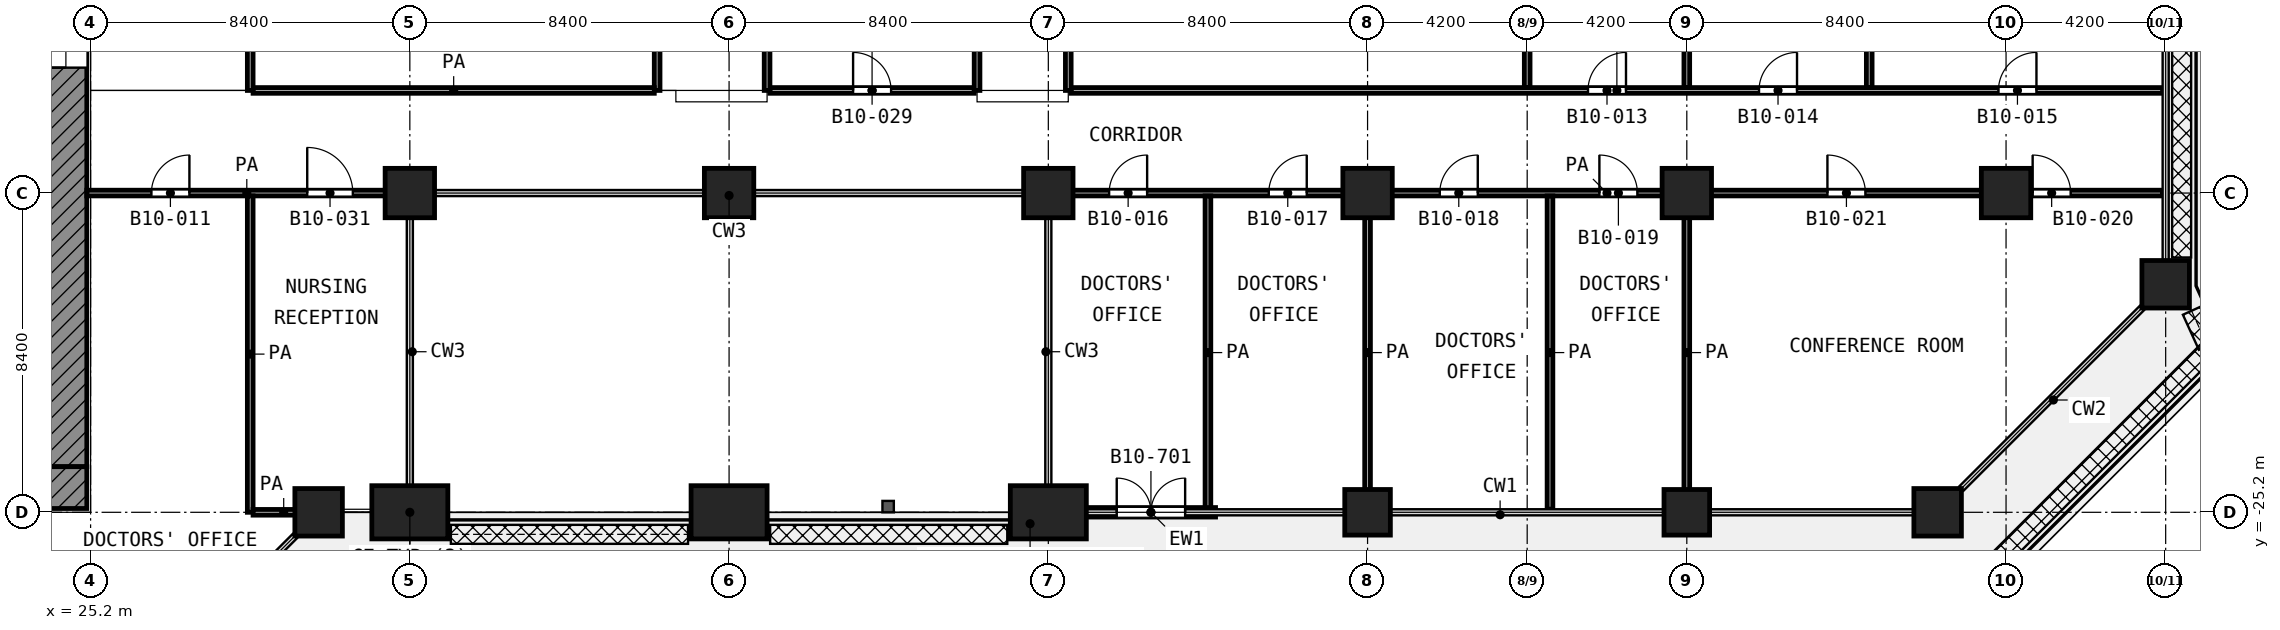
"""IFC4 building model, lengths in metres.
Left out: names, types, materials, properties, quantities, classifications, styles, units other than length and angle.
Written with IfcOpenShell. Run it as: python <this file> out.ifc"""

import sys

from ifc_helpers import new_model, si_unit, direction, frame, frame_2d, origin, origin_2d, place, context, subcontext, project, spatial, rectangle, extrude, element, fill, save


model = new_model("IFC4")
c1 = context("Model", 3, precision=1e-05, world=origin(), true_north=direction((0.0, 1.0)))
c2 = subcontext(c1, "Body", "Model", "MODEL_VIEW")
j1 = project(units=[si_unit("LENGTHUNIT", "METRE"), si_unit("PLANEANGLEUNIT", "RADIAN")], contexts=[c1])
p1 = place(None, origin())
s1 = spatial("IfcSite", under=j1, at=p1, CompositionType="ELEMENT")
p2 = place(p1, origin())
s2 = spatial("IfcBuilding", under=s1, at=p2, CompositionType="ELEMENT")
p3 = place(p2, frame((0.0, 0.0, 47.6)))
s3 = spatial("IfcBuildingStorey", under=s2, at=p3, CompositionType="ELEMENT", Elevation=47.6)
for number, where, z_axis, x_axis in (
    (1, (33.6, -16.8, 0.0), (0.0, 0.0, 1.0), (1.0, 0.0, 0.0)),
    (2, (42.0, -16.8, 0.0), (0.0, 0.0, 1.0), (1.0, 0.0, 0.0)),
    (3, (50.4, -16.8, 0.0), (0.0, 0.0, 1.0), (1.0, 0.0, 0.0)),
    (4, (58.8, -16.8, 0.0), (0.0, 0.0, 1.0), (1.0, 0.0, 0.0)),
    (5, (67.2, -16.8, 0.0), (0.0, 0.0, 1.0), (1.0, 0.0, 0.0)),
    (6, (75.6, -16.8, 0.0), (0.0, 0.0, 1.0), (1.0, 0.0, 0.0)),
):
    element("IfcColumn", number, at=place(p3, frame(where, z_axis=z_axis, x_axis=x_axis)), inside=s3, PredefinedType="COLUMN", context=c2, shape_type="SweptSolid", body=[
        extrude(rectangle(XDim=1.3, YDim=1.3, at=origin_2d()), origin(), (0.0, 0.0, 1.0), 4.2),
    ])
for number, where, z_axis, x_axis in (
    (7, (79.8, -19.2, 0.0), (0.0, 0.0, 1.0), (1.0, 0.0, 0.0)),
    (8, (31.2, -25.2, 0.0), (0.0, 0.0, 1.0), (1.0, 0.0, 0.0)),
):
    element("IfcColumn", number, at=place(p3, frame(where, z_axis=z_axis, x_axis=x_axis)), inside=s3, PredefinedType="COLUMN", context=c2, shape_type="SweptSolid", body=[
        extrude(rectangle(XDim=1.25, YDim=1.25, at=origin_2d()), origin(), (0.0, 0.0, 1.0), 4.2),
    ])
for number, where, z_axis, x_axis in (
    (9, (33.6, -25.2, 0.0), (0.0, 0.0, 1.0), (-1.0, 0.0, 0.0)),
    (10, (42.0, -25.2, 0.0), (0.0, 0.0, 1.0), (-1.0, 0.0, 0.0)),
    (11, (50.4, -25.2, 0.0), (0.0, 0.0, 1.0), (-1.0, 0.0, 0.0)),
):
    element("IfcColumn", number, at=place(p3, frame(where, z_axis=z_axis, x_axis=x_axis)), inside=s3, PredefinedType="COLUMN", context=c2, shape_type="SweptSolid", body=[
        extrude(rectangle(XDim=2.0, YDim=1.4, at=origin_2d()), origin(), (0.0, 0.0, 1.0), 4.2),
    ])
for number, where, z_axis, x_axis in (
    (12, (58.8, -25.2, 0.0), (0.0, 0.0, 1.0), (1.0, 0.0, 0.0)),
    (13, (67.2, -25.2, 0.0), (0.0, 0.0, 1.0), (1.0, 0.0, 0.0)),
):
    element("IfcColumn", number, at=place(p3, frame(where, z_axis=z_axis, x_axis=x_axis)), inside=s3, PredefinedType="COLUMN", context=c2, shape_type="SweptSolid", body=[
        extrude(rectangle(XDim=1.2, YDim=1.2, at=origin_2d()), origin(), (0.0, 0.0, 1.0), 4.2),
    ])
p4 = place(p3, frame((73.8, -25.2, 0.0), z_axis=(0.0, 0.0, 1.0), x_axis=(1.0, 0.0, 0.0)))
e14 = element("IfcColumn", 14, at=p4, inside=s3, PredefinedType="COLUMN", context=c2, shape_type="SweptSolid", body=[
    extrude(rectangle(XDim=1.25, YDim=1.25, at=origin_2d()), origin(), (0.0, 0.0, 1.0), 4.2),
])
p5 = place(p3, frame((51.4, -25.2, 0.0), z_axis=(0.0, 0.0, 1.0), x_axis=(1.0, 0.0, 0.0)))
e15 = element("IfcWall", 15, at=p5, inside=s3, PredefinedType="SOLIDWALL", context=c2, shape_type="SweptSolid", body=[
    extrude(rectangle(XDim=3.4, YDim=0.25, at=frame_2d((1.7, 0.0))), origin(), (0.0, 0.0, 1.0), 3.66),
])
p6 = place(p5, frame((0.8, 0.0, 0.0)))
e16 = element("IfcOpeningElement", 16, at=p6, cuts=e15, PredefinedType="OPENING", context=c2, shape_type="SweptSolid", body=[
    extrude(rectangle(XDim=1.8, YDim=2.1, at=frame_2d((0.9, 1.05))), frame((0.0, 0.135, 0.0), z_axis=(0.0, -1.0, 0.0), x_axis=(1.0, 0.0, 0.0)), (0.0, 0.0, 1.0), 0.27),
])
p7 = place(p3, frame((24.55, -24.0, 0.0), z_axis=(0.0, 0.0, 1.0), x_axis=(0.0, 1.0, 0.0)))
e17 = element("IfcWall", 17, at=p7, inside=s3, PredefinedType="SHEAR", context=c2, shape_type="SweptSolid", body=[
    extrude(rectangle(XDim=18.6, YDim=1.1, at=frame_2d((9.3, 0.0))), origin(), (0.0, 0.0, 1.0), 3.78),
])
p8 = place(p7, frame((10.5, 0.0, 0.0)))
e18 = element("IfcOpeningElement", 18, at=p8, cuts=e17, PredefinedType="OPENING", context=c2, shape_type="SweptSolid", body=[
    extrude(rectangle(XDim=1.8, YDim=2.1, at=frame_2d((0.9, 1.05))), frame((0.0, 0.56, 0.0), z_axis=(0.0, -1.0, 0.0), x_axis=(1.0, 0.0, 0.0)), (0.0, 0.0, 1.0), 1.12),
])
p9 = place(p3, frame((24.55, -25.1, 0.0), z_axis=(0.0, 0.0, 1.0), x_axis=(0.0, 1.0, 0.0)))
e19 = element("IfcWall", 19, at=p9, inside=s3, PredefinedType="SHEAR", context=c2, shape_type="SweptSolid", body=[
    extrude(rectangle(XDim=1.1, YDim=1.1, at=frame_2d((0.55, 0.0))), origin(), (0.0, 0.0, 1.0), 3.78),
])
p10 = place(p3, frame((29.475, -25.2, 0.0), z_axis=(0.0, 0.0, 1.0), x_axis=(1.0, 0.0, 0.0)))
e20 = element("IfcWall", 20, at=p10, inside=s3, PredefinedType="PARTITIONING", context=c2, shape_type="SweptSolid", body=[
    extrude(rectangle(XDim=1.612, YDim=0.15, at=frame_2d((0.806, 0.0))), origin(), (0.0, 0.0, 1.0), 3.78),
])
p11 = place(p3, frame((25.1, -16.8, 0.0), z_axis=(0.0, 0.0, 1.0), x_axis=(1.0, 0.0, 0.0)))
e21 = element("IfcWall", 21, at=p11, inside=s3, PredefinedType="PARTITIONING", context=c2, shape_type="SweptSolid", body=[
    extrude(rectangle(XDim=8.42, YDim=0.15, at=frame_2d((4.21, 0.0))), origin(), (0.0, 0.0, 1.0), 3.78),
])
p12 = place(p11, frame((1.7, 0.0, 0.0)))
e22 = element("IfcOpeningElement", 22, at=p12, cuts=e21, PredefinedType="OPENING", context=c2, shape_type="SweptSolid", body=[
    extrude(rectangle(XDim=1.0, YDim=2.1, at=frame_2d((0.5, 1.05))), frame((0.0, 0.085, 0.0), z_axis=(0.0, -1.0, 0.0), x_axis=(1.0, 0.0, 0.0)), (0.0, 0.0, 1.0), 0.17),
])
p13 = place(p11, frame((5.8, 0.0, 0.0)))
e23 = element("IfcOpeningElement", 23, at=p13, cuts=e21, PredefinedType="OPENING", context=c2, shape_type="SweptSolid", body=[
    extrude(rectangle(XDim=1.2, YDim=2.1, at=frame_2d((0.6, 1.05))), frame((0.0, 0.085, 0.0), z_axis=(0.0, -1.0, 0.0), x_axis=(1.0, 0.0, 0.0)), (0.0, 0.0, 1.0), 0.17),
])
p14 = place(p3, frame((50.48, -16.8, 0.0), z_axis=(0.0, 0.0, 1.0), x_axis=(1.0, 0.0, 0.0)))
e24 = element("IfcWall", 24, at=p14, inside=s3, PredefinedType="PARTITIONING", context=c2, shape_type="SweptSolid", body=[
    extrude(rectangle(XDim=29.24, YDim=0.15, at=frame_2d((14.62, 0.0))), origin(), (0.0, 0.0, 1.0), 3.78),
])
p15 = place(p14, frame((1.52, 0.0, 0.0)))
e25 = element("IfcOpeningElement", 25, at=p15, cuts=e24, PredefinedType="OPENING", context=c2, shape_type="SweptSolid", body=[
    extrude(rectangle(XDim=1.0, YDim=2.1, at=frame_2d((0.5, 1.05))), frame((0.0, 0.085, 0.0), z_axis=(0.0, -1.0, 0.0), x_axis=(1.0, 0.0, 0.0)), (0.0, 0.0, 1.0), 0.17),
])
p16 = place(p14, frame((5.72, 0.0, 0.0)))
e26 = element("IfcOpeningElement", 26, at=p16, cuts=e24, PredefinedType="OPENING", context=c2, shape_type="SweptSolid", body=[
    extrude(rectangle(XDim=1.0, YDim=2.1, at=frame_2d((0.5, 1.05))), frame((0.0, 0.085, 0.0), z_axis=(0.0, -1.0, 0.0), x_axis=(1.0, 0.0, 0.0)), (0.0, 0.0, 1.0), 0.17),
])
p17 = place(p14, frame((10.22, 0.0, 0.0)))
e27 = element("IfcOpeningElement", 27, at=p17, cuts=e24, PredefinedType="OPENING", context=c2, shape_type="SweptSolid", body=[
    extrude(rectangle(XDim=1.0, YDim=2.1, at=frame_2d((0.5, 1.05))), frame((0.0, 0.085, 0.0), z_axis=(0.0, -1.0, 0.0), x_axis=(1.0, 0.0, 0.0)), (0.0, 0.0, 1.0), 0.17),
])
p18 = place(p14, frame((14.42, 0.0, 0.0)))
e28 = element("IfcOpeningElement", 28, at=p18, cuts=e24, PredefinedType="OPENING", context=c2, shape_type="SweptSolid", body=[
    extrude(rectangle(XDim=1.0, YDim=2.1, at=frame_2d((0.5, 1.05))), frame((0.0, 0.085, 0.0), z_axis=(0.0, -1.0, 0.0), x_axis=(1.0, 0.0, 0.0)), (0.0, 0.0, 1.0), 0.17),
])
p19 = place(p14, frame((25.82, 0.0, 0.0)))
e29 = element("IfcOpeningElement", 29, at=p19, cuts=e24, PredefinedType="OPENING", context=c2, shape_type="SweptSolid", body=[
    extrude(rectangle(XDim=1.0, YDim=2.1, at=frame_2d((0.5, 1.05))), frame((0.0, 0.085, 0.0), z_axis=(0.0, -1.0, 0.0), x_axis=(1.0, 0.0, 0.0)), (0.0, 0.0, 1.0), 0.17),
])
p20 = place(p14, frame((20.42, 0.0, 0.0)))
e30 = element("IfcOpeningElement", 30, at=p20, cuts=e24, PredefinedType="OPENING", context=c2, shape_type="SweptSolid", body=[
    extrude(rectangle(XDim=1.0, YDim=2.1, at=frame_2d((0.5, 1.05))), frame((0.0, 0.085, 0.0), z_axis=(0.0, -1.0, 0.0), x_axis=(1.0, 0.0, 0.0)), (0.0, 0.0, 1.0), 0.17),
])
p21 = place(p3, frame((29.475, -14.1, 0.0), z_axis=(0.0, 0.0, 1.0), x_axis=(1.0, 0.0, 0.0)))
e31 = element("IfcWall", 31, at=p21, inside=s3, PredefinedType="PARTITIONING", context=c2, shape_type="SweptSolid", body=[
    extrude(rectangle(XDim=10.557, YDim=0.15, at=frame_2d((5.278, 0.0))), origin(), (0.0, 0.0, 1.0), 3.78),
])
p22 = place(p3, frame((43.075, -14.1, 0.0), z_axis=(0.0, 0.0, 1.0), x_axis=(1.0, 0.0, 0.0)))
e32 = element("IfcWall", 32, at=p22, inside=s3, PredefinedType="PARTITIONING", context=c2, shape_type="SweptSolid", body=[
    extrude(rectangle(XDim=5.375, YDim=0.15, at=frame_2d((2.688, 0.0))), origin(), (0.0, 0.0, 1.0), 3.78),
])
p23 = place(p22, frame((2.188, 0.0, 0.0)))
e33 = element("IfcOpeningElement", 33, at=p23, cuts=e32, PredefinedType="OPENING", context=c2, shape_type="SweptSolid", body=[
    extrude(rectangle(XDim=1.0, YDim=2.1, at=frame_2d((0.5, 1.05))), frame((0.0, 0.085, 0.0), z_axis=(0.0, -1.0, 0.0), x_axis=(1.0, 0.0, 0.0)), (0.0, 0.0, 1.0), 0.17),
])
p24 = place(p3, frame((51.0, -14.1, 0.0), z_axis=(0.0, 0.0, 1.0), x_axis=(1.0, 0.0, 0.0)))
e34 = element("IfcWall", 34, at=p24, inside=s3, PredefinedType="PARTITIONING", context=c2, shape_type="SweptSolid", body=[
    extrude(rectangle(XDim=28.72, YDim=0.15, at=frame_2d((14.36, 0.0))), origin(), (0.0, 0.0, 1.0), 3.78),
])
p25 = place(p24, frame((13.6, 0.0, 0.0)))
e35 = element("IfcOpeningElement", 35, at=p25, cuts=e34, PredefinedType="OPENING", context=c2, shape_type="SweptSolid", body=[
    extrude(rectangle(XDim=1.0, YDim=2.1, at=frame_2d((0.5, 1.05))), frame((0.0, 0.085, 0.0), z_axis=(0.0, -1.0, 0.0), x_axis=(1.0, 0.0, 0.0)), (0.0, 0.0, 1.0), 0.17),
])
p26 = place(p24, frame((18.1, 0.0, 0.0)))
e36 = element("IfcOpeningElement", 36, at=p26, cuts=e34, PredefinedType="OPENING", context=c2, shape_type="SweptSolid", body=[
    extrude(rectangle(XDim=1.0, YDim=2.1, at=frame_2d((0.5, 1.05))), frame((0.0, 0.085, 0.0), z_axis=(0.0, -1.0, 0.0), x_axis=(1.0, 0.0, 0.0)), (0.0, 0.0, 1.0), 0.17),
])
p27 = place(p24, frame((24.4, 0.0, 0.0)))
e37 = element("IfcOpeningElement", 37, at=p27, cuts=e34, PredefinedType="OPENING", context=c2, shape_type="SweptSolid", body=[
    extrude(rectangle(XDim=1.0, YDim=2.1, at=frame_2d((0.5, 1.05))), frame((0.0, 0.085, 0.0), z_axis=(0.0, -1.0, 0.0), x_axis=(1.0, 0.0, 0.0)), (0.0, 0.0, 1.0), 0.17),
])
p28 = place(p3, frame((29.4, -25.2, 0.0), z_axis=(0.0, 0.0, 1.0), x_axis=(0.0, 1.0, 0.0)))
e38 = element("IfcWall", 38, at=p28, inside=s3, PredefinedType="PARTITIONING", context=c2, shape_type="SweptSolid", body=[
    extrude(rectangle(XDim=8.325, YDim=0.15, at=frame_2d((4.163, 0.0))), origin(), (0.0, 0.0, 1.0), 3.78),
])
p29 = place(p3, frame((29.4, -14.1, 0.0), z_axis=(0.0, 0.0, 1.0), x_axis=(0.0, 1.0, 0.0)))
e39 = element("IfcWall", 39, at=p29, inside=s3, PredefinedType="PARTITIONING", context=c2, shape_type="SweptSolid", body=[
    extrude(rectangle(XDim=3.0, YDim=0.15, at=frame_2d((1.5, 0.0))), origin(), (0.0, 0.0, 1.0), 3.78),
])
p30 = place(p3, frame((40.107, -14.1, 0.0), z_axis=(0.0, 0.0, 1.0), x_axis=(0.0, 1.0, 0.0)))
e40 = element("IfcWall", 40, at=p30, inside=s3, PredefinedType="PARTITIONING", context=c2, shape_type="SweptSolid", body=[
    extrude(rectangle(XDim=14.02, YDim=0.15, at=frame_2d((7.01, 0.0))), origin(), (0.0, 0.0, 1.0), 3.78),
])
p31 = place(p30, frame((6.4, 0.0, 0.0)))
e41 = element("IfcOpeningElement", 41, at=p31, cuts=e40, PredefinedType="OPENING", context=c2, shape_type="SweptSolid", body=[
    extrude(rectangle(XDim=1.5, YDim=2.1, at=frame_2d((0.75, 1.05))), frame((0.0, 0.085, 0.0), z_axis=(0.0, -1.0, 0.0), x_axis=(1.0, 0.0, 0.0)), (0.0, 0.0, 1.0), 0.17),
])
p32 = place(p3, frame((43.0, -14.1, 0.0), z_axis=(0.0, 0.0, 1.0), x_axis=(0.0, 1.0, 0.0)))
e42 = element("IfcWall", 42, at=p32, inside=s3, PredefinedType="PARTITIONING", context=c2, shape_type="SweptSolid", body=[
    extrude(rectangle(XDim=5.05, YDim=0.15, at=frame_2d((2.525, 0.0))), origin(), (0.0, 0.0, 1.0), 3.78),
])
p33 = place(p3, frame((48.525, -14.1, 0.0), z_axis=(0.0, 0.0, 1.0), x_axis=(0.0, 1.0, 0.0)))
e43 = element("IfcWall", 43, at=p33, inside=s3, PredefinedType="PARTITIONING", context=c2, shape_type="SweptSolid", body=[
    extrude(rectangle(XDim=5.37, YDim=0.15, at=frame_2d((2.685, 0.0))), origin(), (0.0, 0.0, 1.0), 3.78),
])
p34 = place(p3, frame((50.925, -14.1, 0.0), z_axis=(0.0, 0.0, 1.0), x_axis=(0.0, 1.0, 0.0)))
e44 = element("IfcWall", 44, at=p34, inside=s3, PredefinedType="PARTITIONING", context=c2, shape_type="SweptSolid", body=[
    extrude(rectangle(XDim=12.249, YDim=0.15, at=frame_2d((6.125, 0.0))), origin(), (0.0, 0.0, 1.0), 3.78),
])
p35 = place(p34, frame((6.424, 0.0, 0.0)))
e45 = element("IfcOpeningElement", 45, at=p35, cuts=e44, PredefinedType="OPENING", context=c2, shape_type="SweptSolid", body=[
    extrude(rectangle(XDim=1.0, YDim=2.1, at=frame_2d((0.5, 1.05))), frame((0.0, 0.085, 0.0), z_axis=(0.0, -1.0, 0.0), x_axis=(1.0, 0.0, 0.0)), (0.0, 0.0, 1.0), 0.17),
])
for number, where, z_axis, x_axis in (
    (46, (54.6, -25.12, 0.0), (0.0, 0.0, 1.0), (0.0, 1.0, 0.0)),
    (47, (58.8, -25.12, 0.0), (0.0, 0.0, 1.0), (0.0, 1.0, 0.0)),
):
    element("IfcWall", number, at=place(p3, frame(where, z_axis=z_axis, x_axis=x_axis)), inside=s3, PredefinedType="PARTITIONING", context=c2, shape_type="SweptSolid", body=[
        extrude(rectangle(XDim=8.245, YDim=0.15, at=frame_2d((4.123, 0.0))), origin(), (0.0, 0.0, 1.0), 3.78),
    ])
p36 = place(p3, frame((63.0, -14.025, 0.0), z_axis=(0.0, 0.0, 1.0), x_axis=(0.0, 1.0, 0.0)))
e48 = element("IfcWall", 48, at=p36, inside=s3, PredefinedType="PARTITIONING", context=c2, shape_type="SweptSolid", body=[
    extrude(rectangle(XDim=13.945, YDim=0.15, at=frame_2d((6.972, 0.0))), origin(), (0.0, 0.0, 1.0), 3.78),
])
for number, where, z_axis, x_axis in (
    (49, (63.6, -25.12, 0.0), (0.0, 0.0, 1.0), (0.0, 1.0, 0.0)),
    (50, (67.2, -25.12, 0.0), (0.0, 0.0, 1.0), (0.0, 1.0, 0.0)),
):
    element("IfcWall", number, at=place(p3, frame(where, z_axis=z_axis, x_axis=x_axis)), inside=s3, PredefinedType="PARTITIONING", context=c2, shape_type="SweptSolid", body=[
        extrude(rectangle(XDim=8.245, YDim=0.15, at=frame_2d((4.123, 0.0))), origin(), (0.0, 0.0, 1.0), 3.78),
    ])
for number, where, z_axis, x_axis in (
    (51, (67.2, -14.025, 0.0), (0.0, 0.0, 1.0), (0.0, 1.0, 0.0)),
    (52, (72.0, -14.025, 0.0), (0.0, 0.0, 1.0), (0.0, 1.0, 0.0)),
):
    element("IfcWall", number, at=place(p3, frame(where, z_axis=z_axis, x_axis=x_axis)), inside=s3, PredefinedType="PARTITIONING", context=c2, shape_type="SweptSolid", body=[
        extrude(rectangle(XDim=13.945, YDim=0.15, at=frame_2d((6.972, 0.0))), origin(), (0.0, 0.0, 1.0), 3.78),
    ])
p37 = place(p6, origin())
e53 = element("IfcDoor", 53, at=p37, inside=s3, OperationType="DOUBLE_DOOR_SINGLE_SWING", PredefinedType="DOOR", context=c2, shape_type="SweptSolid", body=[
    extrude(rectangle(XDim=1.8, YDim=2.1, at=frame_2d((0.9, 1.05))), frame((0.0, 0.025, 0.0), z_axis=(0.0, -1.0, 0.0), x_axis=(1.0, 0.0, 0.0)), (0.0, 0.0, 1.0), 0.05),
])
fill(e16, e53)
p38 = place(p8, origin())
e54 = element("IfcDoor", 54, at=p38, inside=s3, OperationType="DOUBLE_DOOR_SINGLE_SWING", PredefinedType="DOOR", context=c2, shape_type="SweptSolid", body=[
    extrude(rectangle(XDim=1.8, YDim=2.1, at=frame_2d((0.9, 1.05))), frame((0.0, 0.025, 0.0), z_axis=(0.0, -1.0, 0.0), x_axis=(1.0, 0.0, 0.0)), (0.0, 0.0, 1.0), 0.05),
])
fill(e18, e54)
p39 = place(p12, origin())
e55 = element("IfcDoor", 55, at=p39, inside=s3, OperationType="SINGLE_SWING_RIGHT", PredefinedType="DOOR", context=c2, shape_type="SweptSolid", body=[
    extrude(rectangle(XDim=1.0, YDim=2.1, at=frame_2d((0.5, 1.05))), frame((0.0, 0.025, 0.0), z_axis=(0.0, -1.0, 0.0), x_axis=(1.0, 0.0, 0.0)), (0.0, 0.0, 1.0), 0.05),
])
fill(e22, e55)
p40 = place(p25, origin())
e56 = element("IfcDoor", 56, at=p40, inside=s3, OperationType="SINGLE_SWING_RIGHT", PredefinedType="DOOR", context=c2, shape_type="SweptSolid", body=[
    extrude(rectangle(XDim=1.0, YDim=2.1, at=frame_2d((0.5, 1.05))), frame((0.0, 0.025, 0.0), z_axis=(0.0, -1.0, 0.0), x_axis=(1.0, 0.0, 0.0)), (0.0, 0.0, 1.0), 0.05),
])
fill(e35, e56)
p41 = place(p26, origin())
e57 = element("IfcDoor", 57, at=p41, inside=s3, OperationType="SINGLE_SWING_RIGHT", PredefinedType="DOOR", context=c2, shape_type="SweptSolid", body=[
    extrude(rectangle(XDim=1.0, YDim=2.1, at=frame_2d((0.5, 1.05))), frame((0.0, 0.025, 0.0), z_axis=(0.0, -1.0, 0.0), x_axis=(1.0, 0.0, 0.0)), (0.0, 0.0, 1.0), 0.05),
])
fill(e36, e57)
p42 = place(p27, origin())
e58 = element("IfcDoor", 58, at=p42, inside=s3, OperationType="SINGLE_SWING_RIGHT", PredefinedType="DOOR", context=c2, shape_type="SweptSolid", body=[
    extrude(rectangle(XDim=1.0, YDim=2.1, at=frame_2d((0.5, 1.05))), frame((0.0, 0.025, 0.0), z_axis=(0.0, -1.0, 0.0), x_axis=(1.0, 0.0, 0.0)), (0.0, 0.0, 1.0), 0.05),
])
fill(e37, e58)
p43 = place(p13, origin())
e59 = element("IfcDoor", 59, at=p43, inside=s3, OperationType="SINGLE_SWING_LEFT", PredefinedType="DOOR", context=c2, shape_type="SweptSolid", body=[
    extrude(rectangle(XDim=1.2, YDim=2.1, at=frame_2d((0.6, 1.05))), frame((0.0, 0.025, 0.0), z_axis=(0.0, -1.0, 0.0), x_axis=(1.0, 0.0, 0.0)), (0.0, 0.0, 1.0), 0.05),
])
fill(e23, e59)
p44 = place(p15, origin())
e60 = element("IfcDoor", 60, at=p44, inside=s3, OperationType="SINGLE_SWING_RIGHT", PredefinedType="DOOR", context=c2, shape_type="SweptSolid", body=[
    extrude(rectangle(XDim=1.0, YDim=2.1, at=frame_2d((0.5, 1.05))), frame((0.0, 0.025, 0.0), z_axis=(0.0, -1.0, 0.0), x_axis=(1.0, 0.0, 0.0)), (0.0, 0.0, 1.0), 0.05),
])
fill(e25, e60)
p45 = place(p16, origin())
e61 = element("IfcDoor", 61, at=p45, inside=s3, OperationType="SINGLE_SWING_RIGHT", PredefinedType="DOOR", context=c2, shape_type="SweptSolid", body=[
    extrude(rectangle(XDim=1.0, YDim=2.1, at=frame_2d((0.5, 1.05))), frame((0.0, 0.025, 0.0), z_axis=(0.0, -1.0, 0.0), x_axis=(1.0, 0.0, 0.0)), (0.0, 0.0, 1.0), 0.05),
])
fill(e26, e61)
p46 = place(p17, origin())
e62 = element("IfcDoor", 62, at=p46, inside=s3, OperationType="SINGLE_SWING_RIGHT", PredefinedType="DOOR", context=c2, shape_type="SweptSolid", body=[
    extrude(rectangle(XDim=1.0, YDim=2.1, at=frame_2d((0.5, 1.05))), frame((0.0, 0.025, 0.0), z_axis=(0.0, -1.0, 0.0), x_axis=(1.0, 0.0, 0.0)), (0.0, 0.0, 1.0), 0.05),
])
fill(e27, e62)
p47 = place(p18, origin())
e63 = element("IfcDoor", 63, at=p47, inside=s3, OperationType="SINGLE_SWING_LEFT", PredefinedType="DOOR", context=c2, shape_type="SweptSolid", body=[
    extrude(rectangle(XDim=1.0, YDim=2.1, at=frame_2d((0.5, 1.05))), frame((0.0, 0.025, 0.0), z_axis=(0.0, -1.0, 0.0), x_axis=(1.0, 0.0, 0.0)), (0.0, 0.0, 1.0), 0.05),
])
fill(e28, e63)
p48 = place(p19, origin())
e64 = element("IfcDoor", 64, at=p48, inside=s3, OperationType="SINGLE_SWING_LEFT", PredefinedType="DOOR", context=c2, shape_type="SweptSolid", body=[
    extrude(rectangle(XDim=1.0, YDim=2.1, at=frame_2d((0.5, 1.05))), frame((0.0, 0.025, 0.0), z_axis=(0.0, -1.0, 0.0), x_axis=(1.0, 0.0, 0.0)), (0.0, 0.0, 1.0), 0.05),
])
fill(e29, e64)
p49 = place(p20, origin())
e65 = element("IfcDoor", 65, at=p49, inside=s3, OperationType="SINGLE_SWING_LEFT", PredefinedType="DOOR", context=c2, shape_type="SweptSolid", body=[
    extrude(rectangle(XDim=1.0, YDim=2.1, at=frame_2d((0.5, 1.05))), frame((0.0, 0.025, 0.0), z_axis=(0.0, -1.0, 0.0), x_axis=(1.0, 0.0, 0.0)), (0.0, 0.0, 1.0), 0.05),
])
fill(e30, e65)
p50 = place(p23, origin())
e66 = element("IfcDoor", 66, at=p50, inside=s3, OperationType="SINGLE_SWING_LEFT", PredefinedType="DOOR", context=c2, shape_type="SweptSolid", body=[
    extrude(rectangle(XDim=1.0, YDim=2.1, at=frame_2d((0.5, 1.05))), frame((0.0, 0.025, 0.0), z_axis=(0.0, -1.0, 0.0), x_axis=(1.0, 0.0, 0.0)), (0.0, 0.0, 1.0), 0.05),
])
fill(e33, e66)
save(model, sys.argv[1])
